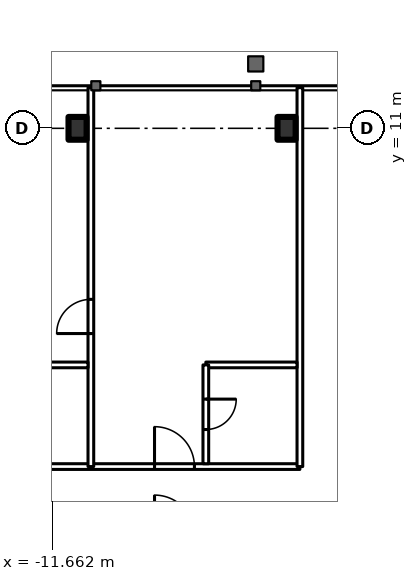
"""IFC4 building model, lengths in metres.
Left out: names, types, materials, properties, quantities, classifications, styles, units other than length and angle.
Written with IfcOpenShell. Run it as: python <this file> out.ifc"""

import sys

from ifc_helpers import new_model, si_unit, direction, frame, frame_2d, origin, origin_2d, place, context, subcontext, project, spatial, rectangle, i_section, extrude, element, fill, save


model = new_model("IFC4")
c1 = context("Model", 3, precision=1e-05, world=origin(), true_north=direction((0.0, 1.0)))
c2 = subcontext(c1, "Body", "Model", "MODEL_VIEW")
j1 = project(units=[si_unit("LENGTHUNIT", "METRE"), si_unit("PLANEANGLEUNIT", "RADIAN")], contexts=[c1])
p1 = place(None, origin())
s1 = spatial("IfcSite", under=j1, at=p1, CompositionType="ELEMENT")
p2 = place(p1, origin())
s2 = spatial("IfcBuilding", under=s1, at=p2, CompositionType="ELEMENT")
p3 = place(p2, frame((0.0, 0.0, 229.7)))
s3 = spatial("IfcBuildingStorey", under=s2, at=p3, CompositionType="ELEMENT", Elevation=229.7)
for number, where, z_axis, x_axis in (
    (1, (-11.0, 11.0, 0.0), (0.0, 0.0, 1.0), (1.0, 0.0, 0.0)),
    (2, (-5.5, 11.0, 0.0), (0.0, 0.0, 1.0), (1.0, 0.0, 0.0)),
):
    element("IfcColumn", number, at=place(p3, frame(where, z_axis=z_axis, x_axis=x_axis)), inside=s3, PredefinedType="COLUMN", context=c2, shape_type="SweptSolid", body=[
        extrude(i_section(OverallWidth=0.476, OverallDepth=0.6, WebThickness=0.1, FlangeThickness=0.14, FilletRadius=0.02, at=origin_2d()), origin(), (0.0, 0.0, 1.0), 3.6),
    ])
p4 = place(p3, frame((-27.5, 2.1, 0.0), z_axis=(0.0, 0.0, 1.0), x_axis=(1.0, 0.0, 0.0)))
e3 = element("IfcWall", 3, at=p4, inside=s3, PredefinedType="PARTITIONING", context=c2, shape_type="SweptSolid", body=[
    extrude(rectangle(XDim=22.35, YDim=0.15, at=frame_2d((11.175, 0.0))), origin(), (0.0, 0.0, 1.0), 3.4),
])
p5 = place(p4, frame((2.025, 0.0, 0.0)))
e4 = element("IfcOpeningElement", 4, at=p5, cuts=e3, PredefinedType="OPENING", context=c2, shape_type="SweptSolid", body=[
    extrude(rectangle(XDim=1.05, YDim=2.4, at=frame_2d((0.525, 1.2))), frame((0.0, 0.085, 0.0), z_axis=(0.0, -1.0, 0.0), x_axis=(1.0, 0.0, 0.0)), (0.0, 0.0, 1.0), 0.17),
])
p6 = place(p4, frame((7.525, 0.0, 0.0)))
e5 = element("IfcOpeningElement", 5, at=p6, cuts=e3, PredefinedType="OPENING", context=c2, shape_type="SweptSolid", body=[
    extrude(rectangle(XDim=1.05, YDim=2.4, at=frame_2d((0.525, 1.2))), frame((0.0, 0.085, 0.0), z_axis=(0.0, -1.0, 0.0), x_axis=(1.0, 0.0, 0.0)), (0.0, 0.0, 1.0), 0.17),
])
p7 = place(p4, frame((13.025, 0.0, 0.0)))
e6 = element("IfcOpeningElement", 6, at=p7, cuts=e3, PredefinedType="OPENING", context=c2, shape_type="SweptSolid", body=[
    extrude(rectangle(XDim=1.05, YDim=2.4, at=frame_2d((0.525, 1.2))), frame((0.0, 0.085, 0.0), z_axis=(0.0, -1.0, 0.0), x_axis=(1.0, 0.0, 0.0)), (0.0, 0.0, 1.0), 0.17),
])
p8 = place(p4, frame((18.525, 0.0, 0.0)))
e7 = element("IfcOpeningElement", 7, at=p8, cuts=e3, PredefinedType="OPENING", context=c2, shape_type="SweptSolid", body=[
    extrude(rectangle(XDim=1.05, YDim=2.4, at=frame_2d((0.525, 1.2))), frame((0.0, 0.085, 0.0), z_axis=(0.0, -1.0, 0.0), x_axis=(1.0, 0.0, 0.0)), (0.0, 0.0, 1.0), 0.17),
])
p9 = place(p3, frame((-10.65, 2.1, 0.0), z_axis=(0.0, 0.0, 1.0), x_axis=(0.0, 1.0, 0.0)))
e8 = element("IfcWall", 8, at=p9, inside=s3, PredefinedType="PARTITIONING", context=c2, shape_type="SweptSolid", body=[
    extrude(rectangle(XDim=9.97, YDim=0.15, at=frame_2d((4.985, 0.0))), origin(), (0.0, 0.0, 1.0), 3.4),
])
p10 = place(p9, frame((3.5, 0.0, 0.0)))
e9 = element("IfcOpeningElement", 9, at=p10, cuts=e8, PredefinedType="OPENING", context=c2, shape_type="SweptSolid", body=[
    extrude(rectangle(XDim=0.9, YDim=2.2, at=frame_2d((0.45, 1.1))), frame((0.0, 0.085, 0.0), z_axis=(0.0, -1.0, 0.0), x_axis=(1.0, 0.0, 0.0)), (0.0, 0.0, 1.0), 0.17),
])
p11 = place(p3, frame((-5.15, 2.1, 0.0), z_axis=(0.0, 0.0, 1.0), x_axis=(0.0, 1.0, 0.0)))
e10 = element("IfcWall", 10, at=p11, inside=s3, PredefinedType="PARTITIONING", context=c2, shape_type="SweptSolid", body=[
    extrude(rectangle(XDim=9.97, YDim=0.15, at=frame_2d((4.985, 0.0))), origin(), (0.0, 0.0, 1.0), 3.4),
])
for number, where, z_axis, x_axis in (
    (11, (-13.125, 4.775, 0.0), (0.0, 0.0, 1.0), (1.0, 0.0, 0.0)),
    (12, (-7.625, 4.775, 0.0), (0.0, 0.0, 1.0), (1.0, 0.0, 0.0)),
):
    element("IfcWall", number, at=place(p3, frame(where, z_axis=z_axis, x_axis=x_axis)), inside=s3, PredefinedType="PARTITIONING", context=c2, shape_type="SweptSolid", body=[
        extrude(rectangle(XDim=2.4, YDim=0.15, at=frame_2d((1.2, 0.0))), origin(), (0.0, 0.0, 1.0), 3.4),
    ])
p12 = place(p3, frame((-7.625, 2.175, 0.0), z_axis=(0.0, 0.0, 1.0), x_axis=(0.0, 1.0, 0.0)))
e13 = element("IfcWall", 13, at=p12, inside=s3, PredefinedType="PARTITIONING", context=c2, shape_type="SweptSolid", body=[
    extrude(rectangle(XDim=2.6, YDim=0.15, at=frame_2d((1.3, 0.0))), origin(), (0.0, 0.0, 1.0), 3.4),
])
p13 = place(p12, frame((0.9, 0.0, 0.0)))
e14 = element("IfcOpeningElement", 14, at=p13, cuts=e13, PredefinedType="OPENING", context=c2, shape_type="SweptSolid", body=[
    extrude(rectangle(XDim=0.8, YDim=2.2, at=frame_2d((0.4, 1.1))), frame((0.0, 0.085, 0.0), z_axis=(0.0, -1.0, 0.0), x_axis=(1.0, 0.0, 0.0)), (0.0, 0.0, 1.0), 0.17),
])
p14 = place(p13, origin())
e15 = element("IfcDoor", 15, at=p14, inside=s3, OperationType="SINGLE_SWING_RIGHT", PredefinedType="DOOR", context=c2, shape_type="SweptSolid", body=[
    extrude(rectangle(XDim=0.8, YDim=2.2, at=frame_2d((0.4, 1.1))), frame((0.0, 0.025, 0.0), z_axis=(0.0, -1.0, 0.0), x_axis=(1.0, 0.0, 0.0)), (0.0, 0.0, 1.0), 0.05),
])
fill(e14, e15)
p15 = place(p8, origin())
e16 = element("IfcDoor", 16, at=p15, inside=s3, OperationType="SINGLE_SWING_LEFT", PredefinedType="DOOR", context=c2, shape_type="SweptSolid", body=[
    extrude(rectangle(XDim=1.05, YDim=2.4, at=frame_2d((0.525, 1.2))), frame((0.0, 0.025, 0.0), z_axis=(0.0, -1.0, 0.0), x_axis=(1.0, 0.0, 0.0)), (0.0, 0.0, 1.0), 0.05),
])
fill(e7, e16)
p16 = place(p10, origin())
e17 = element("IfcDoor", 17, at=p16, inside=s3, OperationType="SINGLE_SWING_LEFT", PredefinedType="DOOR", context=c2, shape_type="SweptSolid", body=[
    extrude(rectangle(XDim=0.9, YDim=2.2, at=frame_2d((0.45, 1.1))), frame((0.0, 0.025, 0.0), z_axis=(0.0, -1.0, 0.0), x_axis=(1.0, 0.0, 0.0)), (0.0, 0.0, 1.0), 0.05),
])
fill(e9, e17)
save(model, sys.argv[1])
